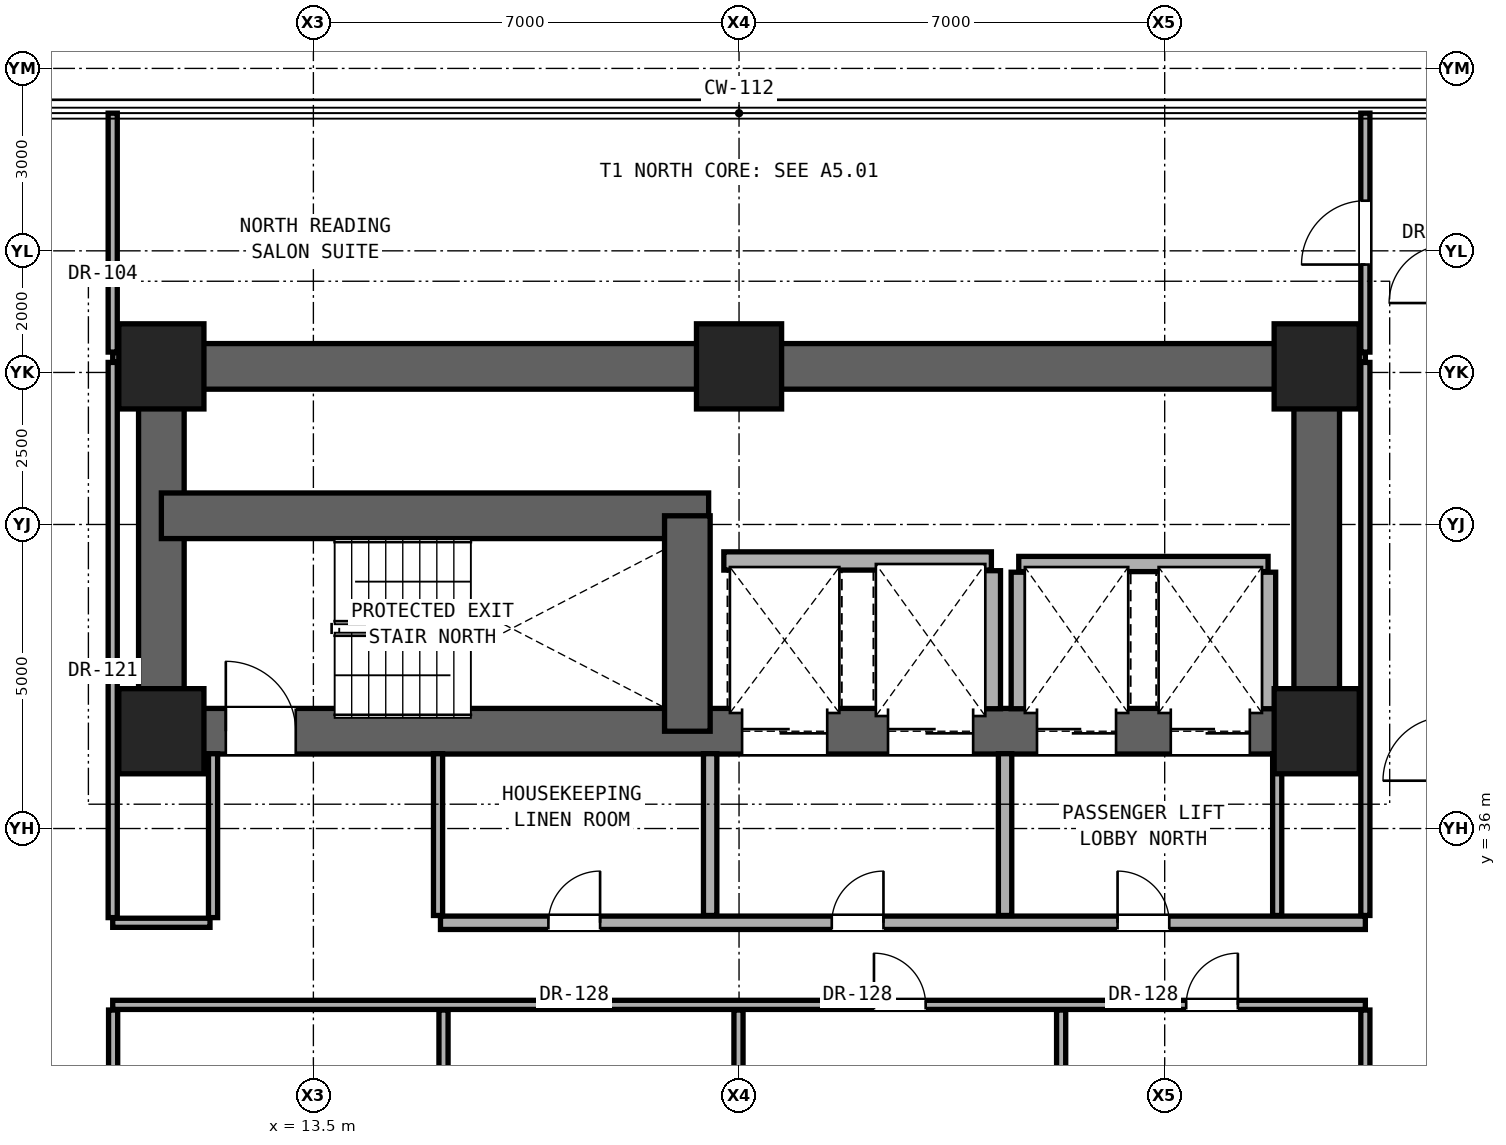
"""IFC4 building model, lengths in metres.
Left out: names, types, materials, properties, quantities, classifications, styles, units other than length and angle.
Written with IfcOpenShell. Run it as: python <this file> out.ifc"""

import sys

from ifc_helpers import new_model, si_unit, direction, frame, frame_2d, origin, origin_2d, place, context, subcontext, project, spatial, rectangle, extrude, element, fill, save


model = new_model("IFC4")
c1 = context("Model", 3, precision=1e-05, world=origin(), true_north=direction((0.0, 1.0)))
c2 = subcontext(c1, "Body", "Model", "MODEL_VIEW")
j1 = project(units=[si_unit("LENGTHUNIT", "METRE"), si_unit("PLANEANGLEUNIT", "RADIAN")], contexts=[c1])
p1 = place(None, origin())
s1 = spatial("IfcSite", under=j1, at=p1, CompositionType="ELEMENT")
p2 = place(p1, origin())
s2 = spatial("IfcBuilding", under=s1, at=p2, CompositionType="ELEMENT")
p3 = place(p2, frame((0.0, 0.0, 48.8)))
s3 = spatial("IfcBuildingStorey", under=s2, at=p3, CompositionType="ELEMENT", Elevation=48.8)
for number, where, z_axis, x_axis in (
    (1, (11.0, 37.6, 0.0), (0.0, 0.0, 1.0), (1.0, 0.0, 0.0)),
    (2, (30.0, 37.6, 0.0), (0.0, 0.0, 1.0), (1.0, 0.0, 0.0)),
    (3, (11.0, 43.6, 0.0), (0.0, 0.0, 1.0), (1.0, 0.0, 0.0)),
    (4, (20.5, 43.6, 0.0), (0.0, 0.0, 1.0), (1.0, 0.0, 0.0)),
    (5, (30.0, 43.6, 0.0), (0.0, 0.0, 1.0), (1.0, 0.0, 0.0)),
):
    element("IfcColumn", number, at=place(p3, frame(where, z_axis=z_axis, x_axis=x_axis)), inside=s3, PredefinedType="COLUMN", context=c2, shape_type="SweptSolid", body=[
        extrude(rectangle(XDim=1.4, YDim=1.4, at=origin_2d()), origin(), (0.0, 0.0, 1.0), 3.3),
    ])
p4 = place(p3, frame((11.0, 43.6, 0.0), z_axis=(0.0, 0.0, 1.0), x_axis=(1.0, 0.0, 0.0)))
e6 = element("IfcWall", 6, at=p4, inside=s3, PredefinedType="SHEAR", context=c2, shape_type="SweptSolid", body=[
    extrude(rectangle(XDim=19.0, YDim=0.75, at=frame_2d((9.5, 0.0))), origin(), (0.0, 0.0, 1.0), 3.06),
])
for number, where, z_axis, x_axis in (
    (7, (11.0, 37.6, 0.0), (0.0, 0.0, 1.0), (0.0, 1.0, 0.0)),
    (8, (30.0, 37.6, 0.0), (0.0, 0.0, 1.0), (0.0, 1.0, 0.0)),
):
    element("IfcWall", number, at=place(p3, frame(where, z_axis=z_axis, x_axis=x_axis)), inside=s3, PredefinedType="SHEAR", context=c2, shape_type="SweptSolid", body=[
        extrude(rectangle(XDim=6.0, YDim=0.75, at=frame_2d((3.0, 0.0))), origin(), (0.0, 0.0, 1.0), 3.06),
    ])
p5 = place(p3, frame((11.0, 37.6, 0.0), z_axis=(0.0, 0.0, 1.0), x_axis=(1.0, 0.0, 0.0)))
e9 = element("IfcWall", 9, at=p5, inside=s3, PredefinedType="SHEAR", context=c2, shape_type="SweptSolid", body=[
    extrude(rectangle(XDim=19.0, YDim=0.75, at=frame_2d((9.5, 0.0))), origin(), (0.0, 0.0, 1.0), 3.06),
])
p6 = place(p5, frame((1.06, 0.0, 0.0)))
e10 = element("IfcOpeningElement", 10, at=p6, cuts=e9, PredefinedType="OPENING", context=c2, shape_type="SweptSolid", body=[
    extrude(rectangle(XDim=1.15, YDim=2.2, at=frame_2d((0.575, 1.1))), frame((0.0, 0.385, 0.0), z_axis=(0.0, -1.0, 0.0), x_axis=(1.0, 0.0, 0.0)), (0.0, 0.0, 1.0), 0.77),
])
p7 = place(p5, frame((9.55, 0.0, 0.0)))
e11 = element("IfcOpeningElement", 11, at=p7, cuts=e9, PredefinedType="OPENING", context=c2, shape_type="SweptSolid", body=[
    extrude(rectangle(XDim=1.4, YDim=2.35, at=frame_2d((0.7, 1.175))), frame((0.0, 0.385, 0.0), z_axis=(0.0, -1.0, 0.0), x_axis=(1.0, 0.0, 0.0)), (0.0, 0.0, 1.0), 0.77),
])
p8 = place(p5, frame((11.95, 0.0, 0.0)))
e12 = element("IfcOpeningElement", 12, at=p8, cuts=e9, PredefinedType="OPENING", context=c2, shape_type="SweptSolid", body=[
    extrude(rectangle(XDim=1.4, YDim=2.35, at=frame_2d((0.7, 1.175))), frame((0.0, 0.385, 0.0), z_axis=(0.0, -1.0, 0.0), x_axis=(1.0, 0.0, 0.0)), (0.0, 0.0, 1.0), 0.77),
])
p9 = place(p5, frame((14.4, 0.0, 0.0)))
e13 = element("IfcOpeningElement", 13, at=p9, cuts=e9, PredefinedType="OPENING", context=c2, shape_type="SweptSolid", body=[
    extrude(rectangle(XDim=1.3, YDim=2.3, at=frame_2d((0.65, 1.15))), frame((0.0, 0.385, 0.0), z_axis=(0.0, -1.0, 0.0), x_axis=(1.0, 0.0, 0.0)), (0.0, 0.0, 1.0), 0.77),
])
p10 = place(p5, frame((16.6, 0.0, 0.0)))
e14 = element("IfcOpeningElement", 14, at=p10, cuts=e9, PredefinedType="OPENING", context=c2, shape_type="SweptSolid", body=[
    extrude(rectangle(XDim=1.3, YDim=2.3, at=frame_2d((0.65, 1.15))), frame((0.0, 0.385, 0.0), z_axis=(0.0, -1.0, 0.0), x_axis=(1.0, 0.0, 0.0)), (0.0, 0.0, 1.0), 0.77),
])
p11 = place(p3, frame((11.0, 41.143, 0.0), z_axis=(0.0, 0.0, 1.0), x_axis=(1.0, 0.0, 0.0)))
e15 = element("IfcWall", 15, at=p11, inside=s3, PredefinedType="SHEAR", context=c2, shape_type="SweptSolid", body=[
    extrude(rectangle(XDim=9.0, YDim=0.75, at=frame_2d((4.5, 0.0))), origin(), (0.0, 0.0, 1.0), 3.06),
])
p12 = place(p3, frame((19.65, 37.6, 0.0), z_axis=(0.0, 0.0, 1.0), x_axis=(0.0, 1.0, 0.0)))
e16 = element("IfcWall", 16, at=p12, inside=s3, PredefinedType="SHEAR", context=c2, shape_type="SweptSolid", body=[
    extrude(rectangle(XDim=3.543, YDim=0.75, at=frame_2d((1.771, 0.0))), origin(), (0.0, 0.0, 1.0), 3.06),
])
p13 = place(p3, frame((10.2, 33.1, 0.0), z_axis=(0.0, 0.0, 1.0), x_axis=(1.0, 0.0, 0.0)))
e17 = element("IfcWall", 17, at=p13, inside=s3, PredefinedType="PARTITIONING", context=c2, shape_type="SweptSolid", body=[
    extrude(rectangle(XDim=20.6, YDim=0.15, at=frame_2d((10.3, 0.0))), origin(), (0.0, 0.0, 1.0), 2.104),
])
p14 = place(p13, frame((12.519, 0.0, 0.0)))
e18 = element("IfcOpeningElement", 18, at=p14, cuts=e17, PredefinedType="OPENING", context=c2, shape_type="SweptSolid", body=[
    extrude(rectangle(XDim=0.85, YDim=2.01, at=frame_2d((0.425, 1.005))), frame((0.0, 0.085, 0.0), z_axis=(0.0, -1.0, 0.0), x_axis=(1.0, 0.0, 0.0)), (0.0, 0.0, 1.0), 0.17),
])
p15 = place(p13, frame((17.654, 0.0, 0.0)))
e19 = element("IfcOpeningElement", 19, at=p15, cuts=e17, PredefinedType="OPENING", context=c2, shape_type="SweptSolid", body=[
    extrude(rectangle(XDim=0.85, YDim=2.01, at=frame_2d((0.425, 1.005))), frame((0.0, 0.085, 0.0), z_axis=(0.0, -1.0, 0.0), x_axis=(1.0, 0.0, 0.0)), (0.0, 0.0, 1.0), 0.17),
])
p16 = place(p3, frame((10.2, 34.45, 0.0), z_axis=(0.0, 0.0, 1.0), x_axis=(1.0, 0.0, 0.0)))
e20 = element("IfcWall", 20, at=p16, inside=s3, PredefinedType="PARTITIONING", context=c2, shape_type="SweptSolid", body=[
    extrude(rectangle(XDim=1.6, YDim=0.15, at=frame_2d((0.8, 0.0))), origin(), (0.0, 0.0, 1.0), 2.104),
])
p17 = place(p3, frame((15.59, 34.45, 0.0), z_axis=(0.0, 0.0, 1.0), x_axis=(1.0, 0.0, 0.0)))
e21 = element("IfcWall", 21, at=p17, inside=s3, PredefinedType="SOLIDWALL", context=c2, shape_type="SweptSolid", body=[
    extrude(rectangle(XDim=15.21, YDim=0.22, at=frame_2d((7.605, 0.0))), origin(), (0.0, 0.0, 1.0), 2.104),
])
p18 = place(p17, frame((6.435, 0.0, 0.0)))
e22 = element("IfcOpeningElement", 22, at=p18, cuts=e21, PredefinedType="OPENING", context=c2, shape_type="SweptSolid", body=[
    extrude(rectangle(XDim=0.85, YDim=2.01, at=frame_2d((0.425, 1.005))), frame((0.0, 0.12, 0.0), z_axis=(0.0, -1.0, 0.0), x_axis=(1.0, 0.0, 0.0)), (0.0, 0.0, 1.0), 0.24),
])
p19 = place(p17, frame((11.135, 0.0, 0.0)))
e23 = element("IfcOpeningElement", 23, at=p19, cuts=e21, PredefinedType="OPENING", context=c2, shape_type="SweptSolid", body=[
    extrude(rectangle(XDim=0.85, YDim=2.01, at=frame_2d((0.425, 1.005))), frame((0.0, 0.12, 0.0), z_axis=(0.0, -1.0, 0.0), x_axis=(1.0, 0.0, 0.0)), (0.0, 0.0, 1.0), 0.24),
])
p20 = place(p17, frame((1.775, 0.0, 0.0)))
e24 = element("IfcOpeningElement", 24, at=p20, cuts=e21, PredefinedType="OPENING", context=c2, shape_type="SweptSolid", body=[
    extrude(rectangle(XDim=0.85, YDim=2.01, at=frame_2d((0.425, 1.005))), frame((0.0, 0.12, 0.0), z_axis=(0.0, -1.0, 0.0), x_axis=(1.0, 0.0, 0.0)), (0.0, 0.0, 1.0), 0.24),
])
p21 = place(p3, frame((25.1, 40.35, 0.0), z_axis=(0.0, 0.0, 1.0), x_axis=(1.0, 0.0, 0.0)))
e25 = element("IfcWall", 25, at=p21, inside=s3, PredefinedType="SOLIDWALL", context=c2, shape_type="SweptSolid", body=[
    extrude(rectangle(XDim=4.1, YDim=0.25, at=frame_2d((2.05, 0.0))), origin(), (0.0, 0.0, 1.0), 3.06),
])
p22 = place(p3, frame((20.25, 40.4, 0.0), z_axis=(0.0, 0.0, 1.0), x_axis=(1.0, 0.0, 0.0)))
e26 = element("IfcWall", 26, at=p22, inside=s3, PredefinedType="SOLIDWALL", context=c2, shape_type="SweptSolid", body=[
    extrude(rectangle(XDim=4.4, YDim=0.3, at=frame_2d((2.2, 0.0))), origin(), (0.0, 0.0, 1.0), 3.06),
])
for number, where, z_axis, x_axis in (
    (27, (10.2, 43.75, 0.0), (0.0, 0.0, 1.0), (1.0, 0.0, 0.0)),
    (28, (30.37, 43.75, 0.0), (0.0, 0.0, 1.0), (1.0, 0.0, 0.0)),
):
    element("IfcWall", number, at=place(p3, frame(where, z_axis=z_axis, x_axis=x_axis)), inside=s3, PredefinedType="PARTITIONING", context=c2, shape_type="SweptSolid", body=[
        extrude(rectangle(XDim=0.43, YDim=0.15, at=frame_2d((0.215, 0.0))), origin(), (0.0, 0.0, 1.0), 3.06),
    ])
p23 = place(p3, frame((10.207, 22.935, 0.0), z_axis=(0.0, 0.0, 1.0), x_axis=(0.0, 1.0, 0.0)))
e29 = element("IfcWall", 29, at=p23, inside=s3, PredefinedType="PARTITIONING", context=c2, shape_type="SweptSolid", body=[
    extrude(rectangle(XDim=10.08, YDim=0.15, at=frame_2d((5.04, 0.0))), origin(), (0.0, 0.0, 1.0), 2.279),
])
p24 = place(p23, frame((4.565, 0.0, 0.0)))
e30 = element("IfcOpeningElement", 30, at=p24, cuts=e29, PredefinedType="OPENING", context=c2, shape_type="SweptSolid", body=[
    extrude(rectangle(XDim=0.95, YDim=2.15, at=frame_2d((0.475, 1.075))), frame((0.0, 0.085, 0.0), z_axis=(0.0, -1.0, 0.0), x_axis=(1.0, 0.0, 0.0)), (0.0, 0.0, 1.0), 0.17),
])
p25 = place(p3, frame((10.2, 34.535, 0.0), z_axis=(0.0, 0.0, 1.0), x_axis=(0.0, 1.0, 0.0)))
e31 = element("IfcWall", 31, at=p25, inside=s3, PredefinedType="PARTITIONING", context=c2, shape_type="SweptSolid", body=[
    extrude(rectangle(XDim=9.13, YDim=0.15, at=frame_2d((4.565, 0.0))), origin(), (0.0, 0.0, 1.0), 2.436),
])
p26 = place(p3, frame((10.2, 43.835, 0.0), z_axis=(0.0, 0.0, 1.0), x_axis=(0.0, 1.0, 0.0)))
e32 = element("IfcWall", 32, at=p26, inside=s3, PredefinedType="PARTITIONING", context=c2, shape_type="SweptSolid", body=[
    extrude(rectangle(XDim=3.929, YDim=0.15, at=frame_2d((1.964, 0.0))), origin(), (0.0, 0.0, 1.0), 3.06),
])
p27 = place(p3, frame((11.85, 34.535, 0.0), z_axis=(0.0, 0.0, 1.0), x_axis=(0.0, 1.0, 0.0)))
e33 = element("IfcWall", 33, at=p27, inside=s3, PredefinedType="PARTITIONING", context=c2, shape_type="SweptSolid", body=[
    extrude(rectangle(XDim=2.695, YDim=0.15, at=frame_2d((1.348, 0.0))), origin(), (0.0, 0.0, 1.0), 3.06),
])
p28 = place(p3, frame((15.64, 22.935, 0.0), z_axis=(0.0, 0.0, 1.0), x_axis=(0.0, 1.0, 0.0)))
e34 = element("IfcWall", 34, at=p28, inside=s3, PredefinedType="PARTITIONING", context=c2, shape_type="SweptSolid", body=[
    extrude(rectangle(XDim=10.08, YDim=0.15, at=frame_2d((5.04, 0.0))), origin(), (0.0, 0.0, 1.0), 2.104),
])
p29 = place(p3, frame((15.55, 34.57, 0.0), z_axis=(0.0, 0.0, 1.0), x_axis=(0.0, 1.0, 0.0)))
e35 = element("IfcWall", 35, at=p29, inside=s3, PredefinedType="PARTITIONING", context=c2, shape_type="SweptSolid", body=[
    extrude(rectangle(XDim=2.66, YDim=0.15, at=frame_2d((1.33, 0.0))), origin(), (0.0, 0.0, 1.0), 2.589),
])
p30 = place(p3, frame((20.025, 34.57, 0.0), z_axis=(0.0, 0.0, 1.0), x_axis=(0.0, 1.0, 0.0)))
e36 = element("IfcWall", 36, at=p30, inside=s3, PredefinedType="SOLIDWALL", context=c2, shape_type="SweptSolid", body=[
    extrude(rectangle(XDim=2.66, YDim=0.22, at=frame_2d((1.33, 0.0))), origin(), (0.0, 0.0, 1.0), 3.06),
])
p31 = place(p3, frame((20.491, 19.985, 0.0), z_axis=(0.0, 0.0, 1.0), x_axis=(0.0, 1.0, 0.0)))
e37 = element("IfcWall", 37, at=p31, inside=s3, PredefinedType="PARTITIONING", context=c2, shape_type="SweptSolid", body=[
    extrude(rectangle(XDim=13.03, YDim=0.15, at=frame_2d((6.515, 0.0))), origin(), (0.0, 0.0, 1.0), 2.104),
])
p32 = place(p3, frame((24.65, 37.97, 0.0), z_axis=(0.0, 0.0, 1.0), x_axis=(0.0, 1.0, 0.0)))
e38 = element("IfcWall", 38, at=p32, inside=s3, PredefinedType="SOLIDWALL", context=c2, shape_type="SweptSolid", body=[
    extrude(rectangle(XDim=2.27, YDim=0.3, at=frame_2d((1.135, 0.0))), origin(), (0.0, 0.0, 1.0), 3.06),
])
p33 = place(p3, frame((24.875, 34.57, 0.0), z_axis=(0.0, 0.0, 1.0), x_axis=(0.0, 1.0, 0.0)))
e39 = element("IfcWall", 39, at=p33, inside=s3, PredefinedType="SOLIDWALL", context=c2, shape_type="SweptSolid", body=[
    extrude(rectangle(XDim=2.66, YDim=0.22, at=frame_2d((1.33, 0.0))), origin(), (0.0, 0.0, 1.0), 3.06),
])
p34 = place(p3, frame((25.1, 37.97, 0.0), z_axis=(0.0, 0.0, 1.0), x_axis=(0.0, 1.0, 0.0)))
e40 = element("IfcWall", 40, at=p34, inside=s3, PredefinedType="SOLIDWALL", context=c2, shape_type="SweptSolid", body=[
    extrude(rectangle(XDim=2.245, YDim=0.25, at=frame_2d((1.123, 0.0))), origin(), (0.0, 0.0, 1.0), 3.06),
])
p35 = place(p3, frame((25.797, 19.985, 0.0), z_axis=(0.0, 0.0, 1.0), x_axis=(0.0, 1.0, 0.0)))
e41 = element("IfcWall", 41, at=p35, inside=s3, PredefinedType="PARTITIONING", context=c2, shape_type="SweptSolid", body=[
    extrude(rectangle(XDim=13.03, YDim=0.15, at=frame_2d((6.515, 0.0))), origin(), (0.0, 0.0, 1.0), 2.104),
])
p36 = place(p3, frame((29.35, 34.57, 0.0), z_axis=(0.0, 0.0, 1.0), x_axis=(0.0, 1.0, 0.0)))
e42 = element("IfcWall", 42, at=p36, inside=s3, PredefinedType="PARTITIONING", context=c2, shape_type="SweptSolid", body=[
    extrude(rectangle(XDim=2.66, YDim=0.15, at=frame_2d((1.33, 0.0))), origin(), (0.0, 0.0, 1.0), 3.06),
])
p37 = place(p3, frame((29.2, 37.97, 0.0), z_axis=(0.0, 0.0, 1.0), x_axis=(0.0, 1.0, 0.0)))
e43 = element("IfcWall", 43, at=p37, inside=s3, PredefinedType="SOLIDWALL", context=c2, shape_type="SweptSolid", body=[
    extrude(rectangle(XDim=2.245, YDim=0.25, at=frame_2d((1.123, 0.0))), origin(), (0.0, 0.0, 1.0), 3.06),
])
p38 = place(p3, frame((30.8, 19.985, 0.0), z_axis=(0.0, 0.0, 1.0), x_axis=(0.0, 1.0, 0.0)))
e44 = element("IfcWall", 44, at=p38, inside=s3, PredefinedType="PARTITIONING", context=c2, shape_type="SweptSolid", body=[
    extrude(rectangle(XDim=13.03, YDim=0.15, at=frame_2d((6.515, 0.0))), origin(), (0.0, 0.0, 1.0), 2.279),
])
p39 = place(p3, frame((30.8, 34.57, 0.0), z_axis=(0.0, 0.0, 1.0), x_axis=(0.0, 1.0, 0.0)))
e45 = element("IfcWall", 45, at=p39, inside=s3, PredefinedType="PARTITIONING", context=c2, shape_type="SweptSolid", body=[
    extrude(rectangle(XDim=9.095, YDim=0.15, at=frame_2d((4.547, 0.0))), origin(), (0.0, 0.0, 1.0), 2.436),
])
p40 = place(p3, frame((30.8, 43.835, 0.0), z_axis=(0.0, 0.0, 1.0), x_axis=(0.0, 1.0, 0.0)))
e46 = element("IfcWall", 46, at=p40, inside=s3, PredefinedType="PARTITIONING", context=c2, shape_type="SweptSolid", body=[
    extrude(rectangle(XDim=3.929, YDim=0.15, at=frame_2d((1.964, 0.0))), origin(), (0.0, 0.0, 1.0), 3.06),
])
p41 = place(p40, frame((1.439, 0.0, 0.0)))
e47 = element("IfcOpeningElement", 47, at=p41, cuts=e46, PredefinedType="OPENING", context=c2, shape_type="SweptSolid", body=[
    extrude(rectangle(XDim=1.05, YDim=2.2, at=frame_2d((0.525, 1.1))), frame((0.0, 0.085, 0.0), z_axis=(0.0, -1.0, 0.0), x_axis=(1.0, 0.0, 0.0)), (0.0, 0.0, 1.0), 0.17),
])
p42 = place(p6, origin())
e48 = element("IfcDoor", 48, at=p42, inside=s3, OperationType="SINGLE_SWING_LEFT", PredefinedType="DOOR", context=c2, shape_type="SweptSolid", body=[
    extrude(rectangle(XDim=1.15, YDim=2.2, at=frame_2d((0.575, 1.1))), frame((0.0, 0.025, 0.0), z_axis=(0.0, -1.0, 0.0), x_axis=(1.0, 0.0, 0.0)), (0.0, 0.0, 1.0), 0.05),
])
fill(e10, e48)
p43 = place(p18, origin())
e49 = element("IfcDoor", 49, at=p43, inside=s3, OperationType="SINGLE_SWING_RIGHT", PredefinedType="DOOR", context=c2, shape_type="SweptSolid", body=[
    extrude(rectangle(XDim=0.85, YDim=2.01, at=frame_2d((0.425, 1.005))), frame((0.0, 0.025, 0.0), z_axis=(0.0, -1.0, 0.0), x_axis=(1.0, 0.0, 0.0)), (0.0, 0.0, 1.0), 0.05),
])
fill(e22, e49)
p44 = place(p19, origin())
e50 = element("IfcDoor", 50, at=p44, inside=s3, OperationType="SINGLE_SWING_LEFT", PredefinedType="DOOR", context=c2, shape_type="SweptSolid", body=[
    extrude(rectangle(XDim=0.85, YDim=2.01, at=frame_2d((0.425, 1.005))), frame((0.0, 0.025, 0.0), z_axis=(0.0, -1.0, 0.0), x_axis=(1.0, 0.0, 0.0)), (0.0, 0.0, 1.0), 0.05),
])
fill(e23, e50)
p45 = place(p20, origin())
e51 = element("IfcDoor", 51, at=p45, inside=s3, OperationType="SINGLE_SWING_RIGHT", PredefinedType="DOOR", context=c2, shape_type="SweptSolid", body=[
    extrude(rectangle(XDim=0.85, YDim=2.01, at=frame_2d((0.425, 1.005))), frame((0.0, 0.025, 0.0), z_axis=(0.0, -1.0, 0.0), x_axis=(1.0, 0.0, 0.0)), (0.0, 0.0, 1.0), 0.05),
])
fill(e24, e51)
p46 = place(p14, origin())
e52 = element("IfcDoor", 52, at=p46, inside=s3, OperationType="SINGLE_SWING_LEFT", PredefinedType="DOOR", context=c2, shape_type="SweptSolid", body=[
    extrude(rectangle(XDim=0.85, YDim=2.01, at=frame_2d((0.425, 1.005))), frame((0.0, 0.025, 0.0), z_axis=(0.0, -1.0, 0.0), x_axis=(1.0, 0.0, 0.0)), (0.0, 0.0, 1.0), 0.05),
])
fill(e18, e52)
p47 = place(p15, origin())
e53 = element("IfcDoor", 53, at=p47, inside=s3, OperationType="SINGLE_SWING_RIGHT", PredefinedType="DOOR", context=c2, shape_type="SweptSolid", body=[
    extrude(rectangle(XDim=0.85, YDim=2.01, at=frame_2d((0.425, 1.005))), frame((0.0, 0.025, 0.0), z_axis=(0.0, -1.0, 0.0), x_axis=(1.0, 0.0, 0.0)), (0.0, 0.0, 1.0), 0.05),
])
fill(e19, e53)
p48 = place(p41, origin())
e54 = element("IfcDoor", 54, at=p48, inside=s3, OperationType="SINGLE_SWING_LEFT", PredefinedType="DOOR", context=c2, shape_type="SweptSolid", body=[
    extrude(rectangle(XDim=1.05, YDim=2.2, at=frame_2d((0.525, 1.1))), frame((0.0, 0.025, 0.0), z_axis=(0.0, -1.0, 0.0), x_axis=(1.0, 0.0, 0.0)), (0.0, 0.0, 1.0), 0.05),
])
fill(e47, e54)
p49 = place(p7, origin())
e55 = element("IfcDoor", 55, at=p49, inside=s3, OperationType="DOUBLE_DOOR_SLIDING", PredefinedType="DOOR", context=c2, shape_type="SweptSolid", body=[
    extrude(rectangle(XDim=1.4, YDim=2.35, at=frame_2d((0.7, 1.175))), frame((0.0, 0.025, 0.0), z_axis=(0.0, -1.0, 0.0), x_axis=(1.0, 0.0, 0.0)), (0.0, 0.0, 1.0), 0.05),
])
fill(e11, e55)
p50 = place(p8, origin())
e56 = element("IfcDoor", 56, at=p50, inside=s3, OperationType="DOUBLE_DOOR_SLIDING", PredefinedType="DOOR", context=c2, shape_type="SweptSolid", body=[
    extrude(rectangle(XDim=1.4, YDim=2.35, at=frame_2d((0.7, 1.175))), frame((0.0, 0.025, 0.0), z_axis=(0.0, -1.0, 0.0), x_axis=(1.0, 0.0, 0.0)), (0.0, 0.0, 1.0), 0.05),
])
fill(e12, e56)
p51 = place(p9, origin())
e57 = element("IfcDoor", 57, at=p51, inside=s3, OperationType="DOUBLE_DOOR_SLIDING", PredefinedType="DOOR", context=c2, shape_type="SweptSolid", body=[
    extrude(rectangle(XDim=1.3, YDim=2.3, at=frame_2d((0.65, 1.15))), frame((0.0, 0.025, 0.0), z_axis=(0.0, -1.0, 0.0), x_axis=(1.0, 0.0, 0.0)), (0.0, 0.0, 1.0), 0.05),
])
fill(e13, e57)
p52 = place(p10, origin())
e58 = element("IfcDoor", 58, at=p52, inside=s3, OperationType="DOUBLE_DOOR_SLIDING", PredefinedType="DOOR", context=c2, shape_type="SweptSolid", body=[
    extrude(rectangle(XDim=1.3, YDim=2.3, at=frame_2d((0.65, 1.15))), frame((0.0, 0.025, 0.0), z_axis=(0.0, -1.0, 0.0), x_axis=(1.0, 0.0, 0.0)), (0.0, 0.0, 1.0), 0.05),
])
fill(e14, e58)
save(model, sys.argv[1])
